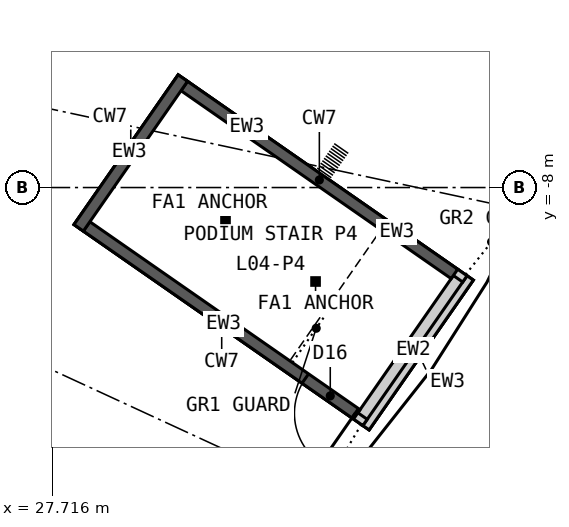
"""IFC4 building model, lengths in metres.
Left out: names, types, materials, properties, quantities, classifications, styles, units other than length and angle.
Written with IfcOpenShell. Run it as: python <this file> out.ifc"""

import sys

from ifc_helpers import new_model, si_unit, direction, frame, frame_2d, origin, place, context, subcontext, project, spatial, rectangle, extrude, element, fill, save


model = new_model("IFC4")
c1 = context("Model", 3, precision=1e-05, world=origin(), true_north=direction((0.0, 1.0)))
c2 = subcontext(c1, "Body", "Model", "MODEL_VIEW")
j1 = project(units=[si_unit("LENGTHUNIT", "METRE"), si_unit("PLANEANGLEUNIT", "RADIAN")], contexts=[c1])
p1 = place(None, origin())
s1 = spatial("IfcSite", under=j1, at=p1, CompositionType="ELEMENT")
p2 = place(p1, origin())
s2 = spatial("IfcBuilding", under=s1, at=p2, CompositionType="ELEMENT")
p3 = place(p2, frame((0.0, 0.0, 24.6)))
s3 = spatial("IfcBuildingStorey", under=s2, at=p3, CompositionType="ELEMENT", Elevation=24.6)
p4 = place(p3, frame((35.849, -14.234, 0.0), z_axis=(0.0, 0.0, 1.0), x_axis=(0.571036173178, 0.820924898467, 0.0)))
e1 = element("IfcWall", 1, at=p4, inside=s3, PredefinedType="SOLIDWALL", context=c2, shape_type="SweptSolid", body=[
    extrude(rectangle(XDim=4.8, YDim=0.5, at=frame_2d((2.4, 0.0))), origin(), (0.0, 0.0, 1.0), 3.3),
])
p5 = place(p3, frame((35.972, -14.32, 3.5), z_axis=(0.0, 0.0, 1.0), x_axis=(0.571036173178, 0.820924898467, 0.0)))
e2 = element("IfcWall", 2, at=p5, inside=s3, PredefinedType="PARAPET", context=c2, shape_type="SweptSolid", body=[
    extrude(rectangle(XDim=4.8, YDim=0.2, at=frame_2d((2.4, 0.0))), origin(), (0.0, 0.0, 1.0), 1.1),
])
p6 = place(p3, frame((38.574, -10.404, 3.5), z_axis=(0.0, 0.0, 1.0), x_axis=(-0.820934908624, 0.571021782248, 0.0)))
e3 = element("IfcWall", 3, at=p6, inside=s3, PredefinedType="PARAPET", context=c2, shape_type="SweptSolid", body=[
    extrude(rectangle(XDim=4.355, YDim=0.2, at=frame_2d((2.177, 0.0))), origin(), (0.0, 0.0, 1.0), 1.1),
])
p7 = place(p3, frame((34.547, -7.603, 3.5), z_axis=(0.0, 0.0, 1.0), x_axis=(-0.820904004174, 0.571066209761, 0.0)))
e4 = element("IfcWall", 4, at=p7, inside=s3, PredefinedType="PARAPET", context=c2, shape_type="SweptSolid", body=[
    extrude(rectangle(XDim=4.155, YDim=0.2, at=frame_2d((2.078, 0.0))), origin(), (0.0, 0.0, 1.0), 1.1),
])
p8 = place(p3, frame((31.111, -5.091, 3.5), z_axis=(0.0, 0.0, 1.0), x_axis=(-0.571036173178, -0.820924898467, 0.0)))
e5 = element("IfcWall", 5, at=p8, inside=s3, PredefinedType="PARAPET", context=c2, shape_type="SweptSolid", body=[
    extrude(rectangle(XDim=4.8, YDim=0.2, at=frame_2d((2.4, 0.0))), origin(), (0.0, 0.0, 1.0), 1.1),
])
p9 = place(p3, frame((28.51, -9.007, 3.5), z_axis=(0.0, 0.0, 1.0), x_axis=(0.820922227988, -0.571040012254, 0.0)))
e6 = element("IfcWall", 6, at=p9, inside=s3, PredefinedType="PARAPET", context=c2, shape_type="SweptSolid", body=[
    extrude(rectangle(XDim=9.06, YDim=0.2, at=frame_2d((4.53, 0.0))), origin(), (0.0, 0.0, 1.0), 1.1),
])
p10 = place(p3, frame((35.729, -13.968, 0.0), z_axis=(0.0, 0.0, 1.0), x_axis=(-0.82092761123, 0.571032273274, 0.0)))
e7 = element("IfcWall", 7, at=p10, inside=s3, PredefinedType="SHEAR", context=c2, shape_type="SweptSolid", body=[
    extrude(rectangle(XDim=8.66, YDim=0.3, at=frame_2d((4.33, 0.0))), origin(), (0.0, 0.0, 1.0), 3.3),
])
p11 = place(p10, frame((0.05, 0.0, 0.0)))
e8 = element("IfcOpeningElement", 8, at=p11, cuts=e7, PredefinedType="OPENING", context=c2, shape_type="SweptSolid", body=[
    extrude(rectangle(XDim=1.6, YDim=2.1, at=frame_2d((0.8, 1.05))), frame((0.0, 0.16, 0.0), z_axis=(0.0, -1.0, 0.0), x_axis=(1.0, 0.0, 0.0)), (0.0, 0.0, 1.0), 0.32),
])
p12 = place(p3, frame((38.299, -10.274, 0.0), z_axis=(0.0, 0.0, 1.0), x_axis=(-0.820936803751, 0.571019057692, 0.0)))
e9 = element("IfcWall", 9, at=p12, inside=s3, PredefinedType="SHEAR", context=c2, shape_type="SweptSolid", body=[
    extrude(rectangle(XDim=8.66, YDim=0.3, at=frame_2d((4.33, 0.0))), origin(), (0.0, 0.0, 1.0), 3.3),
])
p13 = place(p3, frame((28.412, -9.06, 0.0), z_axis=(0.0, 0.0, 1.0), x_axis=(0.571036173178, 0.820924898467, 0.0)))
e10 = element("IfcWall", 10, at=p13, inside=s3, PredefinedType="SHEAR", context=c2, shape_type="SweptSolid", body=[
    extrude(rectangle(XDim=4.8, YDim=0.3, at=frame_2d((2.4, 0.0))), origin(), (0.0, 0.0, 1.0), 3.3),
])
p14 = place(p11, origin())
e11 = element("IfcDoor", 11, at=p14, inside=s3, OperationType="SINGLE_SWING_LEFT", PredefinedType="DOOR", context=c2, shape_type="SweptSolid", body=[
    extrude(rectangle(XDim=1.6, YDim=2.1, at=frame_2d((0.8, 1.05))), frame((0.0, 0.025, 0.0), z_axis=(0.0, -1.0, 0.0), x_axis=(1.0, 0.0, 0.0)), (0.0, 0.0, 1.0), 0.05),
])
fill(e8, e11)
save(model, sys.argv[1])
